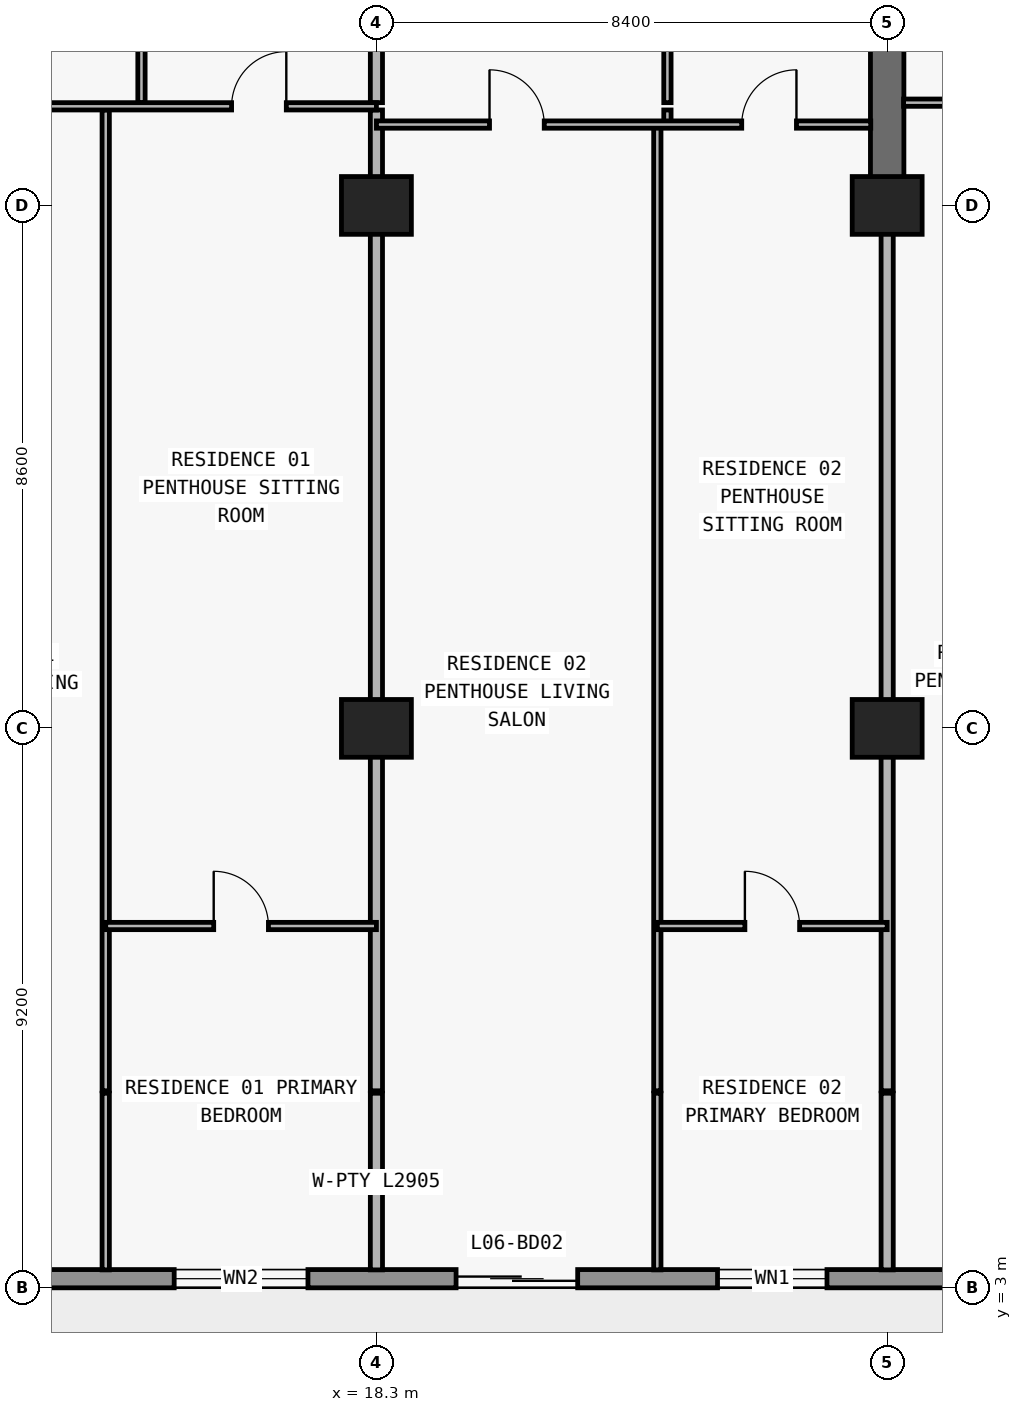
"""IFC4 building model, lengths in metres.
Left out: names, types, materials, properties, quantities, classifications, styles, units other than length and angle.
Written with IfcOpenShell. Run it as: python <this file> out.ifc"""

import sys

from ifc_helpers import new_model, si_unit, direction, frame, frame_2d, origin, origin_2d, place, context, subcontext, project, spatial, rectangle, extrude, element, fill, save


model = new_model("IFC4")
c1 = context("Model", 3, precision=1e-05, world=origin(), true_north=direction((0.0, 1.0)))
c2 = subcontext(c1, "Body", "Model", "MODEL_VIEW")
j1 = project(units=[si_unit("LENGTHUNIT", "METRE"), si_unit("PLANEANGLEUNIT", "RADIAN")], contexts=[c1])
p1 = place(None, origin())
s1 = spatial("IfcSite", under=j1, at=p1, CompositionType="ELEMENT")
p2 = place(p1, origin())
s2 = spatial("IfcBuilding", under=s1, at=p2, CompositionType="ELEMENT")
p3 = place(p2, frame((0.0, 0.0, 30.0)))
s3 = spatial("IfcBuildingStorey", under=s2, at=p3, CompositionType="ELEMENT", Elevation=30.0)
for number, where, z_axis, x_axis in (
    (1, (18.3, 12.2, 0.0), (0.0, 0.0, 1.0), (1.0, 0.0, 0.0)),
    (2, (26.7, 12.2, 0.0), (0.0, 0.0, 1.0), (1.0, 0.0, 0.0)),
    (3, (18.3, 20.8, 0.0), (0.0, 0.0, 1.0), (1.0, 0.0, 0.0)),
    (4, (26.7, 20.8, 0.0), (0.0, 0.0, 1.0), (1.0, 0.0, 0.0)),
):
    element("IfcColumn", number, at=place(p3, frame(where, z_axis=z_axis, x_axis=x_axis)), inside=s3, PredefinedType="COLUMN", context=c2, shape_type="SweptSolid", body=[
        extrude(rectangle(XDim=1.15, YDim=0.95, at=origin_2d()), origin(), (0.0, 0.0, 1.0), 3.05),
    ])
p4 = place(p3, frame((26.7, 20.8, 0.0), z_axis=(0.0, 0.0, 1.0), x_axis=(0.0, 1.0, 0.0)))
e5 = element("IfcWall", 5, at=p4, inside=s3, PredefinedType="SHEAR", context=c2, shape_type="SweptSolid", body=[
    extrude(rectangle(XDim=8.6, YDim=0.55, at=frame_2d((4.3, 0.0))), origin(), (0.0, 0.0, 1.0), 3.05),
])
p5 = place(p3, frame((72.7, 3.15, 0.0), z_axis=(0.0, 0.0, 1.0), x_axis=(-1.0, 0.0, 0.0)))
e6 = element("IfcWall", 6, at=p5, inside=s3, PredefinedType="STANDARD", context=c2, shape_type="SweptSolid", body=[
    extrude(rectangle(XDim=67.6, YDim=0.3, at=frame_2d((33.8, 0.0))), origin(), (0.0, 0.0, 1.0), 3.05),
])
p6 = place(p5, frame((59.826, 0.0, 0.0)))
e7 = element("IfcOpeningElement", 7, at=p6, cuts=e6, PredefinedType="OPENING", context=c2, shape_type="SweptSolid", body=[
    extrude(rectangle(XDim=2.0, YDim=2.3, at=frame_2d((1.0, 1.15))), frame((0.0, 0.16, 0.0), z_axis=(0.0, -1.0, 0.0), x_axis=(1.0, 0.0, 0.0)), (0.0, 0.0, 1.0), 0.32),
])
p7 = place(p5, frame((55.526, 0.0, 0.85)))
e8 = element("IfcOpeningElement", 8, at=p7, cuts=e6, PredefinedType="OPENING", context=c2, shape_type="SweptSolid", body=[
    extrude(rectangle(XDim=2.2, YDim=1.55, at=frame_2d((1.1, 0.775))), frame((0.0, 0.16, 0.0), z_axis=(0.0, -1.0, 0.0), x_axis=(1.0, 0.0, 0.0)), (0.0, 0.0, 1.0), 0.32),
])
p8 = place(p5, frame((51.09, 0.0, 0.0)))
e9 = element("IfcOpeningElement", 9, at=p8, cuts=e6, PredefinedType="OPENING", context=c2, shape_type="SweptSolid", body=[
    extrude(rectangle(XDim=2.0, YDim=2.3, at=frame_2d((1.0, 1.15))), frame((0.0, 0.16, 0.0), z_axis=(0.0, -1.0, 0.0), x_axis=(1.0, 0.0, 0.0)), (0.0, 0.0, 1.0), 0.32),
])
p9 = place(p5, frame((46.99, 0.0, 0.85)))
e10 = element("IfcOpeningElement", 10, at=p9, cuts=e6, PredefinedType="OPENING", context=c2, shape_type="SweptSolid", body=[
    extrude(rectangle(XDim=1.8, YDim=1.55, at=frame_2d((0.9, 0.775))), frame((0.0, 0.16, 0.0), z_axis=(0.0, -1.0, 0.0), x_axis=(1.0, 0.0, 0.0)), (0.0, 0.0, 1.0), 0.32),
])
p10 = place(p5, frame((43.026, 0.0, 0.0)))
e11 = element("IfcOpeningElement", 11, at=p10, cuts=e6, PredefinedType="OPENING", context=c2, shape_type="SweptSolid", body=[
    extrude(rectangle(XDim=2.0, YDim=2.3, at=frame_2d((1.0, 1.15))), frame((0.0, 0.16, 0.0), z_axis=(0.0, -1.0, 0.0), x_axis=(1.0, 0.0, 0.0)), (0.0, 0.0, 1.0), 0.32),
])
p11 = place(p5, frame((38.726, 0.0, 0.85)))
e12 = element("IfcOpeningElement", 12, at=p11, cuts=e6, PredefinedType="OPENING", context=c2, shape_type="SweptSolid", body=[
    extrude(rectangle(XDim=2.2, YDim=1.55, at=frame_2d((1.1, 0.775))), frame((0.0, 0.16, 0.0), z_axis=(0.0, -1.0, 0.0), x_axis=(1.0, 0.0, 0.0)), (0.0, 0.0, 1.0), 0.32),
])
p12 = place(p5, frame((34.69, 0.0, 0.0)))
e13 = element("IfcOpeningElement", 13, at=p12, cuts=e6, PredefinedType="OPENING", context=c2, shape_type="SweptSolid", body=[
    extrude(rectangle(XDim=2.0, YDim=2.3, at=frame_2d((1.0, 1.15))), frame((0.0, 0.16, 0.0), z_axis=(0.0, -1.0, 0.0), x_axis=(1.0, 0.0, 0.0)), (0.0, 0.0, 1.0), 0.32),
])
p13 = place(p5, frame((30.81, 0.0, 0.65)))
e14 = element("IfcOpeningElement", 14, at=p13, cuts=e6, PredefinedType="OPENING", context=c2, shape_type="SweptSolid", body=[
    extrude(rectangle(XDim=2.6, YDim=1.85, at=frame_2d((1.3, 0.925))), frame((0.0, 0.16, 0.0), z_axis=(0.0, -1.0, 0.0), x_axis=(1.0, 0.0, 0.0)), (0.0, 0.0, 1.0), 0.32),
])
p14 = place(p5, frame((24.7, 0.0, 0.85)))
e15 = element("IfcOpeningElement", 15, at=p14, cuts=e6, PredefinedType="OPENING", context=c2, shape_type="SweptSolid", body=[
    extrude(rectangle(XDim=2.2, YDim=1.55, at=frame_2d((1.1, 0.775))), frame((0.0, 0.16, 0.0), z_axis=(0.0, -1.0, 0.0), x_axis=(1.0, 0.0, 0.0)), (0.0, 0.0, 1.0), 0.32),
])
p15 = place(p5, frame((18.626, 0.0, 0.0)))
e16 = element("IfcOpeningElement", 16, at=p15, cuts=e6, PredefinedType="OPENING", context=c2, shape_type="SweptSolid", body=[
    extrude(rectangle(XDim=2.0, YDim=2.3, at=frame_2d((1.0, 1.15))), frame((0.0, 0.16, 0.0), z_axis=(0.0, -1.0, 0.0), x_axis=(1.0, 0.0, 0.0)), (0.0, 0.0, 1.0), 0.32),
])
p16 = place(p5, frame((14.326, 0.0, 0.85)))
e17 = element("IfcOpeningElement", 17, at=p16, cuts=e6, PredefinedType="OPENING", context=c2, shape_type="SweptSolid", body=[
    extrude(rectangle(XDim=2.2, YDim=1.55, at=frame_2d((1.1, 0.775))), frame((0.0, 0.16, 0.0), z_axis=(0.0, -1.0, 0.0), x_axis=(1.0, 0.0, 0.0)), (0.0, 0.0, 1.0), 0.32),
])
p17 = place(p5, frame((9.89, 0.0, 0.0)))
e18 = element("IfcOpeningElement", 18, at=p17, cuts=e6, PredefinedType="OPENING", context=c2, shape_type="SweptSolid", body=[
    extrude(rectangle(XDim=2.0, YDim=2.3, at=frame_2d((1.0, 1.15))), frame((0.0, 0.16, 0.0), z_axis=(0.0, -1.0, 0.0), x_axis=(1.0, 0.0, 0.0)), (0.0, 0.0, 1.0), 0.32),
])
p18 = place(p5, frame((5.79, 0.0, 0.85)))
e19 = element("IfcOpeningElement", 19, at=p18, cuts=e6, PredefinedType="OPENING", context=c2, shape_type="SweptSolid", body=[
    extrude(rectangle(XDim=1.8, YDim=1.55, at=frame_2d((0.9, 0.775))), frame((0.0, 0.16, 0.0), z_axis=(0.0, -1.0, 0.0), x_axis=(1.0, 0.0, 0.0)), (0.0, 0.0, 1.0), 0.32),
])
p19 = place(p3, frame((13.848, 3.295, 0.0), z_axis=(0.0, 0.0, 1.0), x_axis=(0.0, 1.0, 0.0)))
e20 = element("IfcWall", 20, at=p19, inside=s3, PredefinedType="PARTITIONING", context=c2, shape_type="SweptSolid", body=[
    extrude(rectangle(XDim=2.905, YDim=0.12, at=frame_2d((1.453, 0.0))), origin(), (0.0, 0.0, 1.0), 3.05),
])
p20 = place(p3, frame((13.848, 6.24, 0.0), z_axis=(0.0, 0.0, 1.0), x_axis=(0.0, 1.0, 0.0)))
e21 = element("IfcWall", 21, at=p20, inside=s3, PredefinedType="PARTITIONING", context=c2, shape_type="SweptSolid", body=[
    extrude(rectangle(XDim=16.13, YDim=0.12, at=frame_2d((8.065, 0.0))), origin(), (0.0, 0.0, 1.0), 3.05),
])
p21 = place(p3, frame((14.436, 22.49, 0.0), z_axis=(0.0, 0.0, 1.0), x_axis=(0.0, 1.0, 0.0)))
e22 = element("IfcWall", 22, at=p21, inside=s3, PredefinedType="PARTITIONING", context=c2, shape_type="SweptSolid", body=[
    extrude(rectangle(XDim=4.69, YDim=0.12, at=frame_2d((2.345, 0.0))), origin(), (0.0, 0.0, 1.0), 3.05),
])
p22 = place(p21, frame((1.895, 0.0, 0.0)))
e23 = element("IfcOpeningElement", 23, at=p22, cuts=e22, PredefinedType="OPENING", context=c2, shape_type="SweptSolid", body=[
    extrude(rectangle(XDim=0.9, YDim=2.15, at=frame_2d((0.45, 1.075))), frame((0.0, 0.07, 0.0), z_axis=(0.0, -1.0, 0.0), x_axis=(1.0, 0.0, 0.0)), (0.0, 0.0, 1.0), 0.14),
])
p23 = place(p3, frame((18.3, 3.295, 0.0), z_axis=(0.0, 0.0, 1.0), x_axis=(0.0, 1.0, 0.0)))
e24 = element("IfcWall", 24, at=p23, inside=s3, PredefinedType="PARTITIONING", context=c2, shape_type="SweptSolid", body=[
    extrude(rectangle(XDim=2.905, YDim=0.2, at=frame_2d((1.453, 0.0))), origin(), (0.0, 0.0, 1.0), 3.05),
])
p24 = place(p3, frame((18.3, 6.24, 0.0), z_axis=(0.0, 0.0, 1.0), x_axis=(0.0, 1.0, 0.0)))
e25 = element("IfcWall", 25, at=p24, inside=s3, PredefinedType="PARTITIONING", context=c2, shape_type="SweptSolid", body=[
    extrude(rectangle(XDim=16.13, YDim=0.2, at=frame_2d((8.065, 0.0))), origin(), (0.0, 0.0, 1.0), 2.11),
])
p25 = place(p3, frame((18.3, 22.49, 0.0), z_axis=(0.0, 0.0, 1.0), x_axis=(0.0, 1.0, 0.0)))
e26 = element("IfcWall", 26, at=p25, inside=s3, PredefinedType="PARTITIONING", context=c2, shape_type="SweptSolid", body=[
    extrude(rectangle(XDim=4.69, YDim=0.2, at=frame_2d((2.345, 0.0))), origin(), (0.0, 0.0, 1.0), 2.11),
])
p26 = place(p3, frame((22.92, 3.295, 0.0), z_axis=(0.0, 0.0, 1.0), x_axis=(0.0, 1.0, 0.0)))
e27 = element("IfcWall", 27, at=p26, inside=s3, PredefinedType="PARTITIONING", context=c2, shape_type="SweptSolid", body=[
    extrude(rectangle(XDim=2.905, YDim=0.12, at=frame_2d((1.453, 0.0))), origin(), (0.0, 0.0, 1.0), 3.05),
])
p27 = place(p3, frame((22.92, 6.24, 0.0), z_axis=(0.0, 0.0, 1.0), x_axis=(0.0, 1.0, 0.0)))
e28 = element("IfcWall", 28, at=p27, inside=s3, PredefinedType="PARTITIONING", context=c2, shape_type="SweptSolid", body=[
    extrude(rectangle(XDim=15.89, YDim=0.12, at=frame_2d((7.945, 0.0))), origin(), (0.0, 0.0, 1.0), 3.05),
])
p28 = place(p3, frame((23.086, 22.135, 0.0), z_axis=(0.0, 0.0, 1.0), x_axis=(0.0, 1.0, 0.0)))
e29 = element("IfcWall", 29, at=p28, inside=s3, PredefinedType="PARTITIONING", context=c2, shape_type="SweptSolid", body=[
    extrude(rectangle(XDim=0.235, YDim=0.12, at=frame_2d((0.118, 0.0))), origin(), (0.0, 0.0, 1.0), 3.05),
])
p29 = place(p3, frame((23.086, 22.49, 0.0), z_axis=(0.0, 0.0, 1.0), x_axis=(0.0, 1.0, 0.0)))
e30 = element("IfcWall", 30, at=p29, inside=s3, PredefinedType="PARTITIONING", context=c2, shape_type="SweptSolid", body=[
    extrude(rectangle(XDim=4.69, YDim=0.12, at=frame_2d((2.345, 0.0))), origin(), (0.0, 0.0, 1.0), 3.05),
])
p30 = place(p29, frame((1.895, 0.0, 0.0)))
e31 = element("IfcOpeningElement", 31, at=p30, cuts=e30, PredefinedType="OPENING", context=c2, shape_type="SweptSolid", body=[
    extrude(rectangle(XDim=0.9, YDim=2.15, at=frame_2d((0.45, 1.075))), frame((0.0, 0.07, 0.0), z_axis=(0.0, -1.0, 0.0), x_axis=(1.0, 0.0, 0.0)), (0.0, 0.0, 1.0), 0.14),
])
p31 = place(p3, frame((26.7, 3.295, 0.0), z_axis=(0.0, 0.0, 1.0), x_axis=(0.0, 1.0, 0.0)))
e32 = element("IfcWall", 32, at=p31, inside=s3, PredefinedType="PARTITIONING", context=c2, shape_type="SweptSolid", body=[
    extrude(rectangle(XDim=2.905, YDim=0.2, at=frame_2d((1.453, 0.0))), origin(), (0.0, 0.0, 1.0), 3.05),
])
p32 = place(p3, frame((26.7, 6.24, 0.0), z_axis=(0.0, 0.0, 1.0), x_axis=(0.0, 1.0, 0.0)))
e33 = element("IfcWall", 33, at=p32, inside=s3, PredefinedType="PARTITIONING", context=c2, shape_type="SweptSolid", body=[
    extrude(rectangle(XDim=14.555, YDim=0.2, at=frame_2d((7.277, 0.0))), origin(), (0.0, 0.0, 1.0), 2.11),
])
p33 = place(p3, frame((13.848, 8.95, 0.0), z_axis=(0.0, 0.0, 1.0), x_axis=(1.0, 0.0, 0.0)))
e34 = element("IfcWall", 34, at=p33, inside=s3, PredefinedType="PARTITIONING", context=c2, shape_type="SweptSolid", body=[
    extrude(rectangle(XDim=4.452, YDim=0.12, at=frame_2d((2.226, 0.0))), origin(), (0.0, 0.0, 1.0), 3.05),
])
p34 = place(p33, frame((1.776, 0.0, 0.0)))
e35 = element("IfcOpeningElement", 35, at=p34, cuts=e34, PredefinedType="OPENING", context=c2, shape_type="SweptSolid", body=[
    extrude(rectangle(XDim=0.9, YDim=2.15, at=frame_2d((0.45, 1.075))), frame((0.0, 0.07, 0.0), z_axis=(0.0, -1.0, 0.0), x_axis=(1.0, 0.0, 0.0)), (0.0, 0.0, 1.0), 0.14),
])
p35 = place(p3, frame((22.92, 8.95, 0.0), z_axis=(0.0, 0.0, 1.0), x_axis=(1.0, 0.0, 0.0)))
e36 = element("IfcWall", 36, at=p35, inside=s3, PredefinedType="PARTITIONING", context=c2, shape_type="SweptSolid", body=[
    extrude(rectangle(XDim=3.78, YDim=0.12, at=frame_2d((1.89, 0.0))), origin(), (0.0, 0.0, 1.0), 3.05),
])
p36 = place(p35, frame((1.44, 0.0, 0.0)))
e37 = element("IfcOpeningElement", 37, at=p36, cuts=e36, PredefinedType="OPENING", context=c2, shape_type="SweptSolid", body=[
    extrude(rectangle(XDim=0.9, YDim=2.15, at=frame_2d((0.45, 1.075))), frame((0.0, 0.07, 0.0), z_axis=(0.0, -1.0, 0.0), x_axis=(1.0, 0.0, 0.0)), (0.0, 0.0, 1.0), 0.14),
])
p37 = place(p3, frame((18.3, 22.13, 0.0), z_axis=(0.0, 0.0, 1.0), x_axis=(1.0, 0.0, 0.0)))
e38 = element("IfcWall", 38, at=p37, inside=s3, PredefinedType="PARTITIONING", context=c2, shape_type="SweptSolid", body=[
    extrude(rectangle(XDim=8.13, YDim=0.12, at=frame_2d((4.065, 0.0))), origin(), (0.0, 0.0, 1.0), 3.05),
])
p38 = place(p37, frame((1.86, 0.0, 0.0)))
e39 = element("IfcOpeningElement", 39, at=p38, cuts=e38, PredefinedType="OPENING", context=c2, shape_type="SweptSolid", body=[
    extrude(rectangle(XDim=0.9, YDim=2.15, at=frame_2d((0.45, 1.075))), frame((0.0, 0.07, 0.0), z_axis=(0.0, -1.0, 0.0), x_axis=(1.0, 0.0, 0.0)), (0.0, 0.0, 1.0), 0.14),
])
p39 = place(p37, frame((6.008, 0.0, 0.0)))
e40 = element("IfcOpeningElement", 40, at=p39, cuts=e38, PredefinedType="OPENING", context=c2, shape_type="SweptSolid", body=[
    extrude(rectangle(XDim=0.9, YDim=2.15, at=frame_2d((0.45, 1.075))), frame((0.0, 0.07, 0.0), z_axis=(0.0, -1.0, 0.0), x_axis=(1.0, 0.0, 0.0)), (0.0, 0.0, 1.0), 0.14),
])
p40 = place(p3, frame((9.9, 22.43, 0.0), z_axis=(0.0, 0.0, 1.0), x_axis=(1.0, 0.0, 0.0)))
e41 = element("IfcWall", 41, at=p40, inside=s3, PredefinedType="PARTITIONING", context=c2, shape_type="SweptSolid", body=[
    extrude(rectangle(XDim=8.4, YDim=0.12, at=frame_2d((4.2, 0.0))), origin(), (0.0, 0.0, 1.0), 3.05),
])
p41 = place(p40, frame((1.524, 0.0, 0.0)))
e42 = element("IfcOpeningElement", 42, at=p41, cuts=e41, PredefinedType="OPENING", context=c2, shape_type="SweptSolid", body=[
    extrude(rectangle(XDim=0.9, YDim=2.15, at=frame_2d((0.45, 1.075))), frame((0.0, 0.07, 0.0), z_axis=(0.0, -1.0, 0.0), x_axis=(1.0, 0.0, 0.0)), (0.0, 0.0, 1.0), 0.14),
])
p42 = place(p40, frame((6.018, 0.0, 0.0)))
e43 = element("IfcOpeningElement", 43, at=p42, cuts=e41, PredefinedType="OPENING", context=c2, shape_type="SweptSolid", body=[
    extrude(rectangle(XDim=0.9, YDim=2.15, at=frame_2d((0.45, 1.075))), frame((0.0, 0.07, 0.0), z_axis=(0.0, -1.0, 0.0), x_axis=(1.0, 0.0, 0.0)), (0.0, 0.0, 1.0), 0.14),
])
p43 = place(p3, frame((26.97, 22.49, 0.0), z_axis=(0.0, 0.0, 1.0), x_axis=(1.0, 0.0, 0.0)))
e44 = element("IfcWall", 44, at=p43, inside=s3, PredefinedType="PARTITIONING", context=c2, shape_type="SweptSolid", body=[
    extrude(rectangle(XDim=8.125, YDim=0.12, at=frame_2d((4.062, 0.0))), origin(), (0.0, 0.0, 1.0), 3.05),
])
p44 = place(p43, frame((1.389, 0.0, 0.0)))
e45 = element("IfcOpeningElement", 45, at=p44, cuts=e44, PredefinedType="OPENING", context=c2, shape_type="SweptSolid", body=[
    extrude(rectangle(XDim=0.9, YDim=2.15, at=frame_2d((0.45, 1.075))), frame((0.0, 0.07, 0.0), z_axis=(0.0, -1.0, 0.0), x_axis=(1.0, 0.0, 0.0)), (0.0, 0.0, 1.0), 0.14),
])
p45 = place(p43, frame((5.621, 0.0, 0.0)))
e46 = element("IfcOpeningElement", 46, at=p45, cuts=e44, PredefinedType="OPENING", context=c2, shape_type="SweptSolid", body=[
    extrude(rectangle(XDim=0.9, YDim=2.15, at=frame_2d((0.45, 1.075))), frame((0.0, 0.07, 0.0), z_axis=(0.0, -1.0, 0.0), x_axis=(1.0, 0.0, 0.0)), (0.0, 0.0, 1.0), 0.14),
])
p46 = place(p7, origin())
e47 = element("IfcWindow", 47, at=p46, inside=s3, PartitioningType="SINGLE_PANEL", PredefinedType="WINDOW", context=c2, shape_type="SweptSolid", body=[
    extrude(rectangle(XDim=2.2, YDim=1.55, at=frame_2d((1.1, 0.775))), frame((0.0, 0.03, 0.0), z_axis=(0.0, -1.0, 0.0), x_axis=(1.0, 0.0, 0.0)), (0.0, 0.0, 1.0), 0.06),
])
fill(e8, e47)
p47 = place(p8, origin())
e48 = element("IfcDoor", 48, at=p47, inside=s3, OperationType="DOUBLE_DOOR_SLIDING", PredefinedType="DOOR", context=c2, shape_type="SweptSolid", body=[
    extrude(rectangle(XDim=2.0, YDim=2.3, at=frame_2d((1.0, 1.15))), frame((0.0, 0.025, 0.0), z_axis=(0.0, -1.0, 0.0), x_axis=(1.0, 0.0, 0.0)), (0.0, 0.0, 1.0), 0.05),
])
fill(e9, e48)
p48 = place(p9, origin())
e49 = element("IfcWindow", 49, at=p48, inside=s3, PartitioningType="SINGLE_PANEL", PredefinedType="WINDOW", context=c2, shape_type="SweptSolid", body=[
    extrude(rectangle(XDim=1.8, YDim=1.55, at=frame_2d((0.9, 0.775))), frame((0.0, 0.03, 0.0), z_axis=(0.0, -1.0, 0.0), x_axis=(1.0, 0.0, 0.0)), (0.0, 0.0, 1.0), 0.06),
])
fill(e10, e49)
p49 = place(p42, origin())
e50 = element("IfcDoor", 50, at=p49, inside=s3, OperationType="SINGLE_SWING_RIGHT", PredefinedType="DOOR", context=c2, shape_type="SweptSolid", body=[
    extrude(rectangle(XDim=0.9, YDim=2.15, at=frame_2d((0.45, 1.075))), frame((0.0, 0.025, 0.0), z_axis=(0.0, -1.0, 0.0), x_axis=(1.0, 0.0, 0.0)), (0.0, 0.0, 1.0), 0.05),
])
fill(e43, e50)
p50 = place(p34, origin())
e51 = element("IfcDoor", 51, at=p50, inside=s3, OperationType="SINGLE_SWING_LEFT", PredefinedType="DOOR", context=c2, shape_type="SweptSolid", body=[
    extrude(rectangle(XDim=0.9, YDim=2.15, at=frame_2d((0.45, 1.075))), frame((0.0, 0.025, 0.0), z_axis=(0.0, -1.0, 0.0), x_axis=(1.0, 0.0, 0.0)), (0.0, 0.0, 1.0), 0.05),
])
fill(e35, e51)
p51 = place(p38, origin())
e52 = element("IfcDoor", 52, at=p51, inside=s3, OperationType="SINGLE_SWING_LEFT", PredefinedType="DOOR", context=c2, shape_type="SweptSolid", body=[
    extrude(rectangle(XDim=0.9, YDim=2.15, at=frame_2d((0.45, 1.075))), frame((0.0, 0.025, 0.0), z_axis=(0.0, -1.0, 0.0), x_axis=(1.0, 0.0, 0.0)), (0.0, 0.0, 1.0), 0.05),
])
fill(e39, e52)
p52 = place(p39, origin())
e53 = element("IfcDoor", 53, at=p52, inside=s3, OperationType="SINGLE_SWING_RIGHT", PredefinedType="DOOR", context=c2, shape_type="SweptSolid", body=[
    extrude(rectangle(XDim=0.9, YDim=2.15, at=frame_2d((0.45, 1.075))), frame((0.0, 0.025, 0.0), z_axis=(0.0, -1.0, 0.0), x_axis=(1.0, 0.0, 0.0)), (0.0, 0.0, 1.0), 0.05),
])
fill(e40, e53)
p53 = place(p36, origin())
e54 = element("IfcDoor", 54, at=p53, inside=s3, OperationType="SINGLE_SWING_LEFT", PredefinedType="DOOR", context=c2, shape_type="SweptSolid", body=[
    extrude(rectangle(XDim=0.9, YDim=2.15, at=frame_2d((0.45, 1.075))), frame((0.0, 0.025, 0.0), z_axis=(0.0, -1.0, 0.0), x_axis=(1.0, 0.0, 0.0)), (0.0, 0.0, 1.0), 0.05),
])
fill(e37, e54)
save(model, sys.argv[1])
